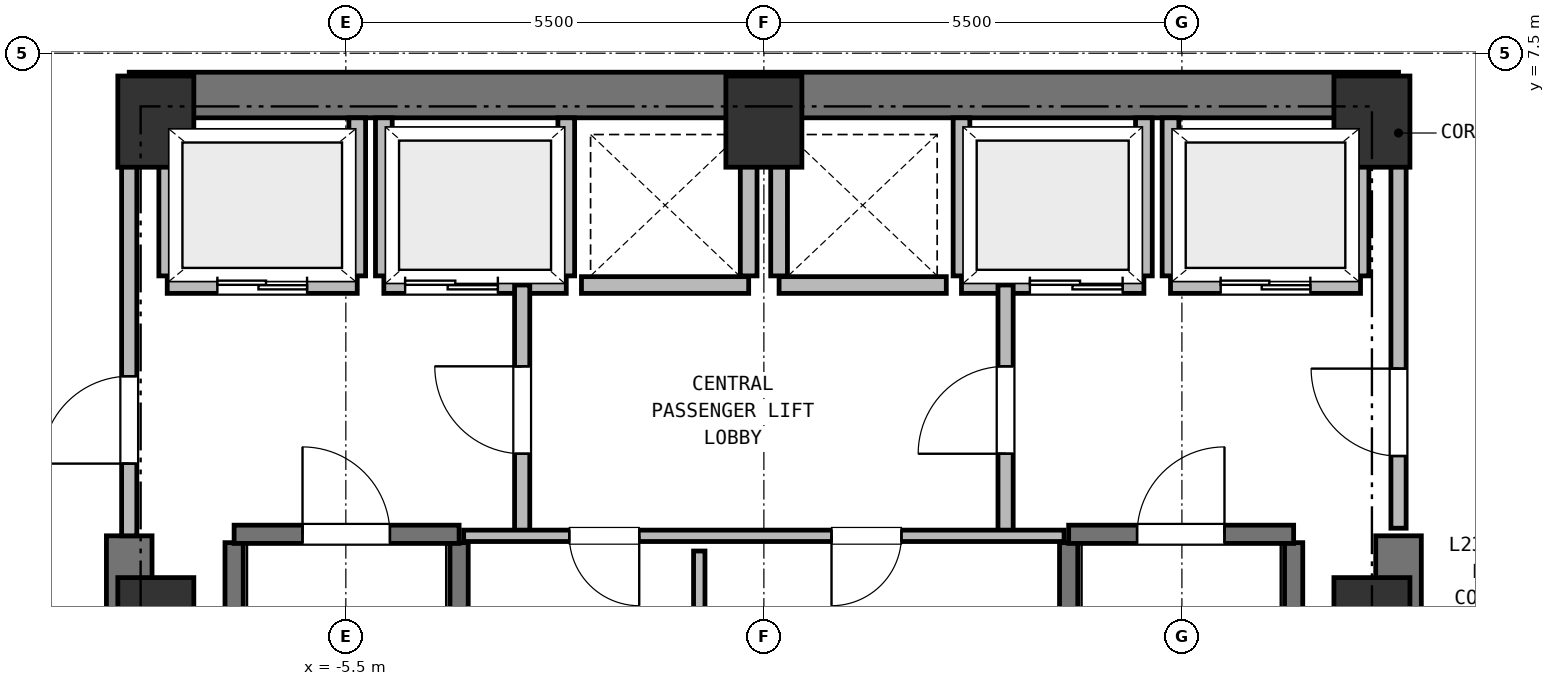
"""IFC4 building model, lengths in metres.
Left out: names, types, materials, properties, quantities, classifications, styles, units other than length and angle.
Written with IfcOpenShell. Run it as: python <this file> out.ifc"""

import sys

from ifc_helpers import new_model, si_unit, direction, frame, frame_2d, origin, origin_2d, place, context, subcontext, project, spatial, rectangle, extrude, element, fill, save


model = new_model("IFC4")
c1 = context("Model", 3, precision=1e-05, world=origin(), true_north=direction((0.0, 1.0)))
c2 = subcontext(c1, "Body", "Model", "MODEL_VIEW")
j1 = project(units=[si_unit("LENGTHUNIT", "METRE"), si_unit("PLANEANGLEUNIT", "RADIAN")], contexts=[c1])
p1 = place(None, origin())
s1 = spatial("IfcSite", under=j1, at=p1, CompositionType="ELEMENT")
p2 = place(p1, origin())
s2 = spatial("IfcBuilding", under=s1, at=p2, CompositionType="ELEMENT")
p3 = place(p2, frame((0.0, 0.0, 97.25)))
s3 = spatial("IfcBuildingStorey", under=s2, at=p3, CompositionType="ELEMENT", Elevation=97.25)
for number, where, z_axis, x_axis in (
    (1, (8.0, 0.0, 0.0), (0.0, 0.0, 1.0), (1.0, 0.0, 0.0)),
    (2, (8.0, 6.6, 0.0), (0.0, 0.0, 1.0), (1.0, 0.0, 0.0)),
    (3, (0.0, 6.6, 0.0), (0.0, 0.0, 1.0), (1.0, 0.0, 0.0)),
    (4, (-8.0, 6.6, 0.0), (0.0, 0.0, 1.0), (1.0, 0.0, 0.0)),
    (5, (-8.0, 0.0, 0.0), (0.0, 0.0, 1.0), (1.0, 0.0, 0.0)),
):
    element("IfcColumn", number, at=place(p3, frame(where, z_axis=z_axis, x_axis=x_axis)), inside=s3, PredefinedType="COLUMN", context=c2, shape_type="SweptSolid", body=[
        extrude(rectangle(XDim=1.0, YDim=1.2, at=origin_2d()), origin(), (0.0, 0.0, 1.0), 3.75),
    ])
p4 = place(p3, frame((-8.35, 6.95, 0.0), z_axis=(0.0, 0.0, 1.0), x_axis=(1.0, 0.0, 0.0)))
e6 = element("IfcWall", 6, at=p4, inside=s3, PredefinedType="SHEAR", context=c2, shape_type="SweptSolid", body=[
    extrude(rectangle(XDim=16.7, YDim=0.6, at=frame_2d((8.35, 0.0))), origin(), (0.0, 0.0, 1.0), 3.5),
])
for number, where, z_axis, x_axis in (
    (7, (-8.35, -6.95, 0.0), (0.0, 0.0, 1.0), (0.0, 1.0, 0.0)),
    (8, (8.35, -6.95, 0.0), (0.0, 0.0, 1.0), (0.0, 1.0, 0.0)),
):
    element("IfcWall", number, at=place(p3, frame(where, z_axis=z_axis, x_axis=x_axis)), inside=s3, PredefinedType="SHEAR", context=c2, shape_type="SweptSolid", body=[
        extrude(rectangle(XDim=8.1, YDim=0.6, at=frame_2d((4.05, 0.0))), origin(), (0.0, 0.0, 1.0), 3.5),
    ])
for number, where, z_axis, x_axis in (
    (9, (-6.97, -6.16, 0.0), (0.0, 0.0, 1.0), (0.0, 1.0, 0.0)),
    (10, (-4.01, -6.16, 0.0), (0.0, 0.0, 1.0), (0.0, 1.0, 0.0)),
):
    element("IfcWall", number, at=place(p3, frame(where, z_axis=z_axis, x_axis=x_axis)), inside=s3, PredefinedType="SHEAR", context=c2, shape_type="SweptSolid", body=[
        extrude(rectangle(XDim=7.22, YDim=0.24, at=frame_2d((3.61, 0.0))), origin(), (0.0, 0.0, 1.0), 3.5),
    ])
p5 = place(p3, frame((-6.97, 1.17, 0.0), z_axis=(0.0, 0.0, 1.0), x_axis=(1.0, 0.0, 0.0)))
e11 = element("IfcWall", 11, at=p5, inside=s3, PredefinedType="SHEAR", context=c2, shape_type="SweptSolid", body=[
    extrude(rectangle(XDim=2.96, YDim=0.24, at=frame_2d((1.48, 0.0))), origin(), (0.0, 0.0, 1.0), 3.5),
])
p6 = place(p5, frame((0.9, 0.0, 0.0)))
e12 = element("IfcOpeningElement", 12, at=p6, cuts=e11, PredefinedType="OPENING", context=c2, shape_type="SweptSolid", body=[
    extrude(rectangle(XDim=1.15, YDim=2.15, at=frame_2d((0.575, 1.075))), frame((0.0, 0.13, 0.0), z_axis=(0.0, -1.0, 0.0), x_axis=(1.0, 0.0, 0.0)), (0.0, 0.0, 1.0), 0.26),
])
for number, where, z_axis, x_axis in (
    (13, (4.01, -6.16, 0.0), (0.0, 0.0, 1.0), (0.0, 1.0, 0.0)),
    (14, (6.97, -6.16, 0.0), (0.0, 0.0, 1.0), (0.0, 1.0, 0.0)),
):
    element("IfcWall", number, at=place(p3, frame(where, z_axis=z_axis, x_axis=x_axis)), inside=s3, PredefinedType="SHEAR", context=c2, shape_type="SweptSolid", body=[
        extrude(rectangle(XDim=7.22, YDim=0.24, at=frame_2d((3.61, 0.0))), origin(), (0.0, 0.0, 1.0), 3.5),
    ])
p7 = place(p3, frame((4.01, 1.17, 0.0), z_axis=(0.0, 0.0, 1.0), x_axis=(1.0, 0.0, 0.0)))
e15 = element("IfcWall", 15, at=p7, inside=s3, PredefinedType="SHEAR", context=c2, shape_type="SweptSolid", body=[
    extrude(rectangle(XDim=2.96, YDim=0.24, at=frame_2d((1.48, 0.0))), origin(), (0.0, 0.0, 1.0), 3.5),
])
p8 = place(p7, frame((0.9, 0.0, 0.0)))
e16 = element("IfcOpeningElement", 16, at=p8, cuts=e15, PredefinedType="OPENING", context=c2, shape_type="SweptSolid", body=[
    extrude(rectangle(XDim=1.15, YDim=2.15, at=frame_2d((0.575, 1.075))), frame((0.0, 0.13, 0.0), z_axis=(0.0, -1.0, 0.0), x_axis=(1.0, 0.0, 0.0)), (0.0, 0.0, 1.0), 0.26),
])
p9 = place(p3, frame((-7.85, 4.45, 0.0), z_axis=(0.0, 0.0, 1.0), x_axis=(1.0, 0.0, 0.0)))
e17 = element("IfcWall", 17, at=p9, inside=s3, PredefinedType="PARTITIONING", context=c2, shape_type="SweptSolid", body=[
    extrude(rectangle(XDim=2.5, YDim=0.22, at=frame_2d((1.25, 0.0))), origin(), (0.0, 0.0, 1.0), 3.5),
])
p10 = place(p9, frame((0.66, 0.0, 0.0)))
e18 = element("IfcOpeningElement", 18, at=p10, cuts=e17, PredefinedType="OPENING", context=c2, shape_type="SweptSolid", body=[
    extrude(rectangle(XDim=1.18, YDim=2.15, at=frame_2d((0.59, 1.075))), frame((0.0, 0.12, 0.0), z_axis=(0.0, -1.0, 0.0), x_axis=(1.0, 0.0, 0.0)), (0.0, 0.0, 1.0), 0.24),
])
p11 = place(p3, frame((-7.85, 4.57, 0.0), z_axis=(0.0, 0.0, 1.0), x_axis=(0.0, 1.0, 0.0)))
e19 = element("IfcWall", 19, at=p11, inside=s3, PredefinedType="PARTITIONING", context=c2, shape_type="SweptSolid", body=[
    extrude(rectangle(XDim=2.08, YDim=0.22, at=frame_2d((1.04, 0.0))), origin(), (0.0, 0.0, 1.0), 3.12),
])
p12 = place(p3, frame((-5.35, 4.57, 0.0), z_axis=(0.0, 0.0, 1.0), x_axis=(0.0, 1.0, 0.0)))
e20 = element("IfcWall", 20, at=p12, inside=s3, PredefinedType="PARTITIONING", context=c2, shape_type="SweptSolid", body=[
    extrude(rectangle(XDim=2.08, YDim=0.22, at=frame_2d((1.04, 0.0))), origin(), (0.0, 0.0, 1.0), 3.5),
])
p13 = place(p3, frame((5.35, 4.45, 0.0), z_axis=(0.0, 0.0, 1.0), x_axis=(1.0, 0.0, 0.0)))
e21 = element("IfcWall", 21, at=p13, inside=s3, PredefinedType="PARTITIONING", context=c2, shape_type="SweptSolid", body=[
    extrude(rectangle(XDim=2.5, YDim=0.22, at=frame_2d((1.25, 0.0))), origin(), (0.0, 0.0, 1.0), 3.5),
])
p14 = place(p13, frame((0.66, 0.0, 0.0)))
e22 = element("IfcOpeningElement", 22, at=p14, cuts=e21, PredefinedType="OPENING", context=c2, shape_type="SweptSolid", body=[
    extrude(rectangle(XDim=1.18, YDim=2.15, at=frame_2d((0.59, 1.075))), frame((0.0, 0.12, 0.0), z_axis=(0.0, -1.0, 0.0), x_axis=(1.0, 0.0, 0.0)), (0.0, 0.0, 1.0), 0.24),
])
p15 = place(p3, frame((5.35, 4.57, 0.0), z_axis=(0.0, 0.0, 1.0), x_axis=(0.0, 1.0, 0.0)))
e23 = element("IfcWall", 23, at=p15, inside=s3, PredefinedType="PARTITIONING", context=c2, shape_type="SweptSolid", body=[
    extrude(rectangle(XDim=2.08, YDim=0.22, at=frame_2d((1.04, 0.0))), origin(), (0.0, 0.0, 1.0), 3.5),
])
p16 = place(p3, frame((7.85, 4.57, 0.0), z_axis=(0.0, 0.0, 1.0), x_axis=(0.0, 1.0, 0.0)))
e24 = element("IfcWall", 24, at=p16, inside=s3, PredefinedType="PARTITIONING", context=c2, shape_type="SweptSolid", body=[
    extrude(rectangle(XDim=2.08, YDim=0.22, at=frame_2d((1.04, 0.0))), origin(), (0.0, 0.0, 1.0), 3.12),
])
p17 = place(p3, frame((-5.0, 4.45, 0.0), z_axis=(0.0, 0.0, 1.0), x_axis=(1.0, 0.0, 0.0)))
e25 = element("IfcWall", 25, at=p17, inside=s3, PredefinedType="PARTITIONING", context=c2, shape_type="SweptSolid", body=[
    extrude(rectangle(XDim=2.4, YDim=0.22, at=frame_2d((1.2, 0.0))), origin(), (0.0, 0.0, 1.0), 3.5),
])
p18 = place(p17, frame((0.28, 0.0, 0.0)))
e26 = element("IfcOpeningElement", 26, at=p18, cuts=e25, PredefinedType="OPENING", context=c2, shape_type="SweptSolid", body=[
    extrude(rectangle(XDim=1.22, YDim=2.15, at=frame_2d((0.61, 1.075))), frame((0.0, 0.12, 0.0), z_axis=(0.0, -1.0, 0.0), x_axis=(1.0, 0.0, 0.0)), (0.0, 0.0, 1.0), 0.24),
])
for number, where, z_axis, x_axis in (
    (27, (-5.0, 4.57, 0.0), (0.0, 0.0, 1.0), (0.0, 1.0, 0.0)),
    (28, (-2.6, 4.57, 0.0), (0.0, 0.0, 1.0), (0.0, 1.0, 0.0)),
):
    element("IfcWall", number, at=place(p3, frame(where, z_axis=z_axis, x_axis=x_axis)), inside=s3, PredefinedType="PARTITIONING", context=c2, shape_type="SweptSolid", body=[
        extrude(rectangle(XDim=2.08, YDim=0.22, at=frame_2d((1.04, 0.0))), origin(), (0.0, 0.0, 1.0), 3.5),
    ])
p19 = place(p3, frame((2.6, 4.45, 0.0), z_axis=(0.0, 0.0, 1.0), x_axis=(1.0, 0.0, 0.0)))
e29 = element("IfcWall", 29, at=p19, inside=s3, PredefinedType="PARTITIONING", context=c2, shape_type="SweptSolid", body=[
    extrude(rectangle(XDim=2.4, YDim=0.22, at=frame_2d((1.2, 0.0))), origin(), (0.0, 0.0, 1.0), 3.5),
])
p20 = place(p19, frame((0.9, 0.0, 0.0)))
e30 = element("IfcOpeningElement", 30, at=p20, cuts=e29, PredefinedType="OPENING", context=c2, shape_type="SweptSolid", body=[
    extrude(rectangle(XDim=1.22, YDim=2.15, at=frame_2d((0.61, 1.075))), frame((0.0, 0.12, 0.0), z_axis=(0.0, -1.0, 0.0), x_axis=(1.0, 0.0, 0.0)), (0.0, 0.0, 1.0), 0.24),
])
for number, where, z_axis, x_axis in (
    (31, (2.6, 4.57, 0.0), (0.0, 0.0, 1.0), (0.0, 1.0, 0.0)),
    (32, (5.0, 4.57, 0.0), (0.0, 0.0, 1.0), (0.0, 1.0, 0.0)),
):
    element("IfcWall", number, at=place(p3, frame(where, z_axis=z_axis, x_axis=x_axis)), inside=s3, PredefinedType="PARTITIONING", context=c2, shape_type="SweptSolid", body=[
        extrude(rectangle(XDim=2.08, YDim=0.22, at=frame_2d((1.04, 0.0))), origin(), (0.0, 0.0, 1.0), 3.5),
    ])
p21 = place(p3, frame((-2.4, 4.45, 0.0), z_axis=(0.0, 0.0, 1.0), x_axis=(1.0, 0.0, 0.0)))
e33 = element("IfcWall", 33, at=p21, inside=s3, PredefinedType="PARTITIONING", context=c2, shape_type="SweptSolid", body=[
    extrude(rectangle(XDim=2.2, YDim=0.22, at=frame_2d((1.1, 0.0))), origin(), (0.0, 0.0, 1.0), 3.5),
])
p22 = place(p3, frame((-0.2, 4.57, 0.0), z_axis=(0.0, 0.0, 1.0), x_axis=(0.0, 1.0, 0.0)))
e34 = element("IfcWall", 34, at=p22, inside=s3, PredefinedType="PARTITIONING", context=c2, shape_type="SweptSolid", body=[
    extrude(rectangle(XDim=2.08, YDim=0.22, at=frame_2d((1.04, 0.0))), origin(), (0.0, 0.0, 1.0), 3.5),
])
p23 = place(p3, frame((0.2, 4.45, 0.0), z_axis=(0.0, 0.0, 1.0), x_axis=(1.0, 0.0, 0.0)))
e35 = element("IfcWall", 35, at=p23, inside=s3, PredefinedType="PARTITIONING", context=c2, shape_type="SweptSolid", body=[
    extrude(rectangle(XDim=2.2, YDim=0.22, at=frame_2d((1.1, 0.0))), origin(), (0.0, 0.0, 1.0), 3.5),
])
p24 = place(p3, frame((0.2, 4.57, 0.0), z_axis=(0.0, 0.0, 1.0), x_axis=(0.0, 1.0, 0.0)))
e36 = element("IfcWall", 36, at=p24, inside=s3, PredefinedType="PARTITIONING", context=c2, shape_type="SweptSolid", body=[
    extrude(rectangle(XDim=2.08, YDim=0.22, at=frame_2d((1.04, 0.0))), origin(), (0.0, 0.0, 1.0), 3.5),
])
p25 = place(p3, frame((-3.18, 1.15, 0.0), z_axis=(0.0, 0.0, 1.0), x_axis=(0.0, 1.0, 0.0)))
e37 = element("IfcWall", 37, at=p25, inside=s3, PredefinedType="PARTITIONING", context=c2, shape_type="SweptSolid", body=[
    extrude(rectangle(XDim=3.3, YDim=0.2, at=frame_2d((1.65, 0.0))), origin(), (0.0, 0.0, 1.0), 3.5),
])
p26 = place(p25, frame((1.08, 0.0, 0.0)))
e38 = element("IfcOpeningElement", 38, at=p26, cuts=e37, PredefinedType="OPENING", context=c2, shape_type="SweptSolid", body=[
    extrude(rectangle(XDim=1.15, YDim=2.15, at=frame_2d((0.575, 1.075))), frame((0.0, 0.11, 0.0), z_axis=(0.0, -1.0, 0.0), x_axis=(1.0, 0.0, 0.0)), (0.0, 0.0, 1.0), 0.22),
])
p27 = place(p3, frame((3.18, 1.15, 0.0), z_axis=(0.0, 0.0, 1.0), x_axis=(0.0, 1.0, 0.0)))
e39 = element("IfcWall", 39, at=p27, inside=s3, PredefinedType="PARTITIONING", context=c2, shape_type="SweptSolid", body=[
    extrude(rectangle(XDim=3.3, YDim=0.2, at=frame_2d((1.65, 0.0))), origin(), (0.0, 0.0, 1.0), 3.5),
])
p28 = place(p27, frame((1.08, 0.0, 0.0)))
e40 = element("IfcOpeningElement", 40, at=p28, cuts=e39, PredefinedType="OPENING", context=c2, shape_type="SweptSolid", body=[
    extrude(rectangle(XDim=1.15, YDim=2.15, at=frame_2d((0.575, 1.075))), frame((0.0, 0.11, 0.0), z_axis=(0.0, -1.0, 0.0), x_axis=(1.0, 0.0, 0.0)), (0.0, 0.0, 1.0), 0.22),
])
p29 = place(p3, frame((-8.35, 1.15, 0.0), z_axis=(0.0, 0.0, 1.0), x_axis=(0.0, 1.0, 0.0)))
e41 = element("IfcWall", 41, at=p29, inside=s3, PredefinedType="PARTITIONING", context=c2, shape_type="SweptSolid", body=[
    extrude(rectangle(XDim=5.4, YDim=0.2, at=frame_2d((2.7, 0.0))), origin(), (0.0, 0.0, 1.0), 3.5),
])
p30 = place(p29, frame((0.95, 0.0, 0.0)))
e42 = element("IfcOpeningElement", 42, at=p30, cuts=e41, PredefinedType="OPENING", context=c2, shape_type="SweptSolid", body=[
    extrude(rectangle(XDim=1.15, YDim=2.15, at=frame_2d((0.575, 1.075))), frame((0.0, 0.11, 0.0), z_axis=(0.0, -1.0, 0.0), x_axis=(1.0, 0.0, 0.0)), (0.0, 0.0, 1.0), 0.22),
])
p31 = place(p3, frame((8.35, 1.25, 0.0), z_axis=(0.0, 0.0, 1.0), x_axis=(0.0, 1.0, 0.0)))
e43 = element("IfcWall", 43, at=p31, inside=s3, PredefinedType="PARTITIONING", context=c2, shape_type="SweptSolid", body=[
    extrude(rectangle(XDim=5.3, YDim=0.2, at=frame_2d((2.65, 0.0))), origin(), (0.0, 0.0, 1.0), 3.5),
])
p32 = place(p31, frame((0.95, 0.0, 0.0)))
e44 = element("IfcOpeningElement", 44, at=p32, cuts=e43, PredefinedType="OPENING", context=c2, shape_type="SweptSolid", body=[
    extrude(rectangle(XDim=1.15, YDim=2.15, at=frame_2d((0.575, 1.075))), frame((0.0, 0.11, 0.0), z_axis=(0.0, -1.0, 0.0), x_axis=(1.0, 0.0, 0.0)), (0.0, 0.0, 1.0), 0.22),
])
p33 = place(p3, frame((3.95, 1.15, 0.0), z_axis=(0.0, 0.0, 1.0), x_axis=(-1.0, 0.0, 0.0)))
e45 = element("IfcWall", 45, at=p33, inside=s3, PredefinedType="PARTITIONING", context=c2, shape_type="SweptSolid", body=[
    extrude(rectangle(XDim=7.9, YDim=0.15, at=frame_2d((3.95, 0.0))), origin(), (0.0, 0.0, 1.0), 3.5),
])
p34 = place(p33, frame((5.59, 0.0, 0.0)))
e46 = element("IfcOpeningElement", 46, at=p34, cuts=e45, PredefinedType="OPENING", context=c2, shape_type="SweptSolid", body=[
    extrude(rectangle(XDim=0.92, YDim=2.05, at=frame_2d((0.46, 1.025))), frame((0.0, 0.085, 0.0), z_axis=(0.0, -1.0, 0.0), x_axis=(1.0, 0.0, 0.0)), (0.0, 0.0, 1.0), 0.17),
])
p35 = place(p33, frame((2.14, 0.0, 0.0)))
e47 = element("IfcOpeningElement", 47, at=p35, cuts=e45, PredefinedType="OPENING", context=c2, shape_type="SweptSolid", body=[
    extrude(rectangle(XDim=0.92, YDim=2.05, at=frame_2d((0.46, 1.025))), frame((0.0, 0.085, 0.0), z_axis=(0.0, -1.0, 0.0), x_axis=(1.0, 0.0, 0.0)), (0.0, 0.0, 1.0), 0.17),
])
p36 = place(p3, frame((-0.85, -6.58, 0.0), z_axis=(0.0, 0.0, 1.0), x_axis=(0.0, 1.0, 0.0)))
e48 = element("IfcWall", 48, at=p36, inside=s3, PredefinedType="PARTITIONING", context=c2, shape_type="SweptSolid", body=[
    extrude(rectangle(XDim=7.53, YDim=0.15, at=frame_2d((3.765, 0.0))), origin(), (0.0, 0.0, 1.0), 3.5),
])
p37 = place(p3, frame((8.678, 9.272, 0.0), z_axis=(0.0, 0.0, 1.0), x_axis=(0.707106781187, -0.707106781187, 0.0)))
e49 = element("IfcWall", 49, at=p37, inside=s3, PredefinedType="PARTITIONING", context=c2, shape_type="SweptSolid", body=[
    extrude(rectangle(XDim=2.89, YDim=0.15, at=frame_2d((1.445, 0.0))), origin(), (0.0, 0.0, 1.0), 3.5),
])
p38 = place(p37, frame((0.28, 0.0, 0.0)))
e50 = element("IfcOpeningElement", 50, at=p38, cuts=e49, PredefinedType="OPENING", context=c2, shape_type="SweptSolid", body=[
    extrude(rectangle(XDim=1.06, YDim=2.15, at=frame_2d((0.53, 1.075))), frame((0.0, 0.085, 0.0), z_axis=(0.0, -1.0, 0.0), x_axis=(1.0, 0.0, 0.0)), (0.0, 0.0, 1.0), 0.17),
])
p39 = place(p3, frame((-10.722, 7.228, 0.0), z_axis=(0.0, 0.0, 1.0), x_axis=(0.707106781187, 0.707106781187, 0.0)))
e51 = element("IfcWall", 51, at=p39, inside=s3, PredefinedType="PARTITIONING", context=c2, shape_type="SweptSolid", body=[
    extrude(rectangle(XDim=2.89, YDim=0.15, at=frame_2d((1.445, 0.0))), origin(), (0.0, 0.0, 1.0), 3.5),
])
p40 = place(p6, origin())
e52 = element("IfcDoor", 52, at=p40, inside=s3, OperationType="SINGLE_SWING_LEFT", PredefinedType="DOOR", context=c2, shape_type="SweptSolid", body=[
    extrude(rectangle(XDim=1.15, YDim=2.15, at=frame_2d((0.575, 1.075))), frame((0.0, 0.025, 0.0), z_axis=(0.0, -1.0, 0.0), x_axis=(1.0, 0.0, 0.0)), (0.0, 0.0, 1.0), 0.05),
])
fill(e12, e52)
p41 = place(p8, origin())
e53 = element("IfcDoor", 53, at=p41, inside=s3, OperationType="SINGLE_SWING_RIGHT", PredefinedType="DOOR", context=c2, shape_type="SweptSolid", body=[
    extrude(rectangle(XDim=1.15, YDim=2.15, at=frame_2d((0.575, 1.075))), frame((0.0, 0.025, 0.0), z_axis=(0.0, -1.0, 0.0), x_axis=(1.0, 0.0, 0.0)), (0.0, 0.0, 1.0), 0.05),
])
fill(e16, e53)
p42 = place(p10, origin())
e54 = element("IfcDoor", 54, at=p42, inside=s3, OperationType="DOUBLE_DOOR_SLIDING", PredefinedType="DOOR", context=c2, shape_type="SweptSolid", body=[
    extrude(rectangle(XDim=1.18, YDim=2.15, at=frame_2d((0.59, 1.075))), frame((0.0, 0.025, 0.0), z_axis=(0.0, -1.0, 0.0), x_axis=(1.0, 0.0, 0.0)), (0.0, 0.0, 1.0), 0.05),
])
fill(e18, e54)
p43 = place(p14, origin())
e55 = element("IfcDoor", 55, at=p43, inside=s3, OperationType="DOUBLE_DOOR_SLIDING", PredefinedType="DOOR", context=c2, shape_type="SweptSolid", body=[
    extrude(rectangle(XDim=1.18, YDim=2.15, at=frame_2d((0.59, 1.075))), frame((0.0, 0.025, 0.0), z_axis=(0.0, -1.0, 0.0), x_axis=(1.0, 0.0, 0.0)), (0.0, 0.0, 1.0), 0.05),
])
fill(e22, e55)
p44 = place(p18, origin())
e56 = element("IfcDoor", 56, at=p44, inside=s3, OperationType="DOUBLE_DOOR_SLIDING", PredefinedType="DOOR", context=c2, shape_type="SweptSolid", body=[
    extrude(rectangle(XDim=1.22, YDim=2.15, at=frame_2d((0.61, 1.075))), frame((0.0, 0.025, 0.0), z_axis=(0.0, -1.0, 0.0), x_axis=(1.0, 0.0, 0.0)), (0.0, 0.0, 1.0), 0.05),
])
fill(e26, e56)
p45 = place(p20, origin())
e57 = element("IfcDoor", 57, at=p45, inside=s3, OperationType="DOUBLE_DOOR_SLIDING", PredefinedType="DOOR", context=c2, shape_type="SweptSolid", body=[
    extrude(rectangle(XDim=1.22, YDim=2.15, at=frame_2d((0.61, 1.075))), frame((0.0, 0.025, 0.0), z_axis=(0.0, -1.0, 0.0), x_axis=(1.0, 0.0, 0.0)), (0.0, 0.0, 1.0), 0.05),
])
fill(e30, e57)
p46 = place(p26, origin())
e58 = element("IfcDoor", 58, at=p46, inside=s3, OperationType="SINGLE_SWING_RIGHT", PredefinedType="DOOR", context=c2, shape_type="SweptSolid", body=[
    extrude(rectangle(XDim=1.15, YDim=2.15, at=frame_2d((0.575, 1.075))), frame((0.0, 0.025, 0.0), z_axis=(0.0, -1.0, 0.0), x_axis=(1.0, 0.0, 0.0)), (0.0, 0.0, 1.0), 0.05),
])
fill(e38, e58)
p47 = place(p28, origin())
e59 = element("IfcDoor", 59, at=p47, inside=s3, OperationType="SINGLE_SWING_LEFT", PredefinedType="DOOR", context=c2, shape_type="SweptSolid", body=[
    extrude(rectangle(XDim=1.15, YDim=2.15, at=frame_2d((0.575, 1.075))), frame((0.0, 0.025, 0.0), z_axis=(0.0, -1.0, 0.0), x_axis=(1.0, 0.0, 0.0)), (0.0, 0.0, 1.0), 0.05),
])
fill(e40, e59)
p48 = place(p30, origin())
e60 = element("IfcDoor", 60, at=p48, inside=s3, OperationType="SINGLE_SWING_LEFT", PredefinedType="DOOR", context=c2, shape_type="SweptSolid", body=[
    extrude(rectangle(XDim=1.15, YDim=2.15, at=frame_2d((0.575, 1.075))), frame((0.0, 0.025, 0.0), z_axis=(0.0, -1.0, 0.0), x_axis=(1.0, 0.0, 0.0)), (0.0, 0.0, 1.0), 0.05),
])
fill(e42, e60)
p49 = place(p32, origin())
e61 = element("IfcDoor", 61, at=p49, inside=s3, OperationType="SINGLE_SWING_RIGHT", PredefinedType="DOOR", context=c2, shape_type="SweptSolid", body=[
    extrude(rectangle(XDim=1.15, YDim=2.15, at=frame_2d((0.575, 1.075))), frame((0.0, 0.025, 0.0), z_axis=(0.0, -1.0, 0.0), x_axis=(1.0, 0.0, 0.0)), (0.0, 0.0, 1.0), 0.05),
])
fill(e44, e61)
p50 = place(p34, origin())
e62 = element("IfcDoor", 62, at=p50, inside=s3, OperationType="SINGLE_SWING_LEFT", PredefinedType="DOOR", context=c2, shape_type="SweptSolid", body=[
    extrude(rectangle(XDim=0.92, YDim=2.05, at=frame_2d((0.46, 1.025))), frame((0.0, 0.025, 0.0), z_axis=(0.0, -1.0, 0.0), x_axis=(1.0, 0.0, 0.0)), (0.0, 0.0, 1.0), 0.05),
])
fill(e46, e62)
p51 = place(p35, origin())
e63 = element("IfcDoor", 63, at=p51, inside=s3, OperationType="SINGLE_SWING_RIGHT", PredefinedType="DOOR", context=c2, shape_type="SweptSolid", body=[
    extrude(rectangle(XDim=0.92, YDim=2.05, at=frame_2d((0.46, 1.025))), frame((0.0, 0.025, 0.0), z_axis=(0.0, -1.0, 0.0), x_axis=(1.0, 0.0, 0.0)), (0.0, 0.0, 1.0), 0.05),
])
fill(e47, e63)
save(model, sys.argv[1])
